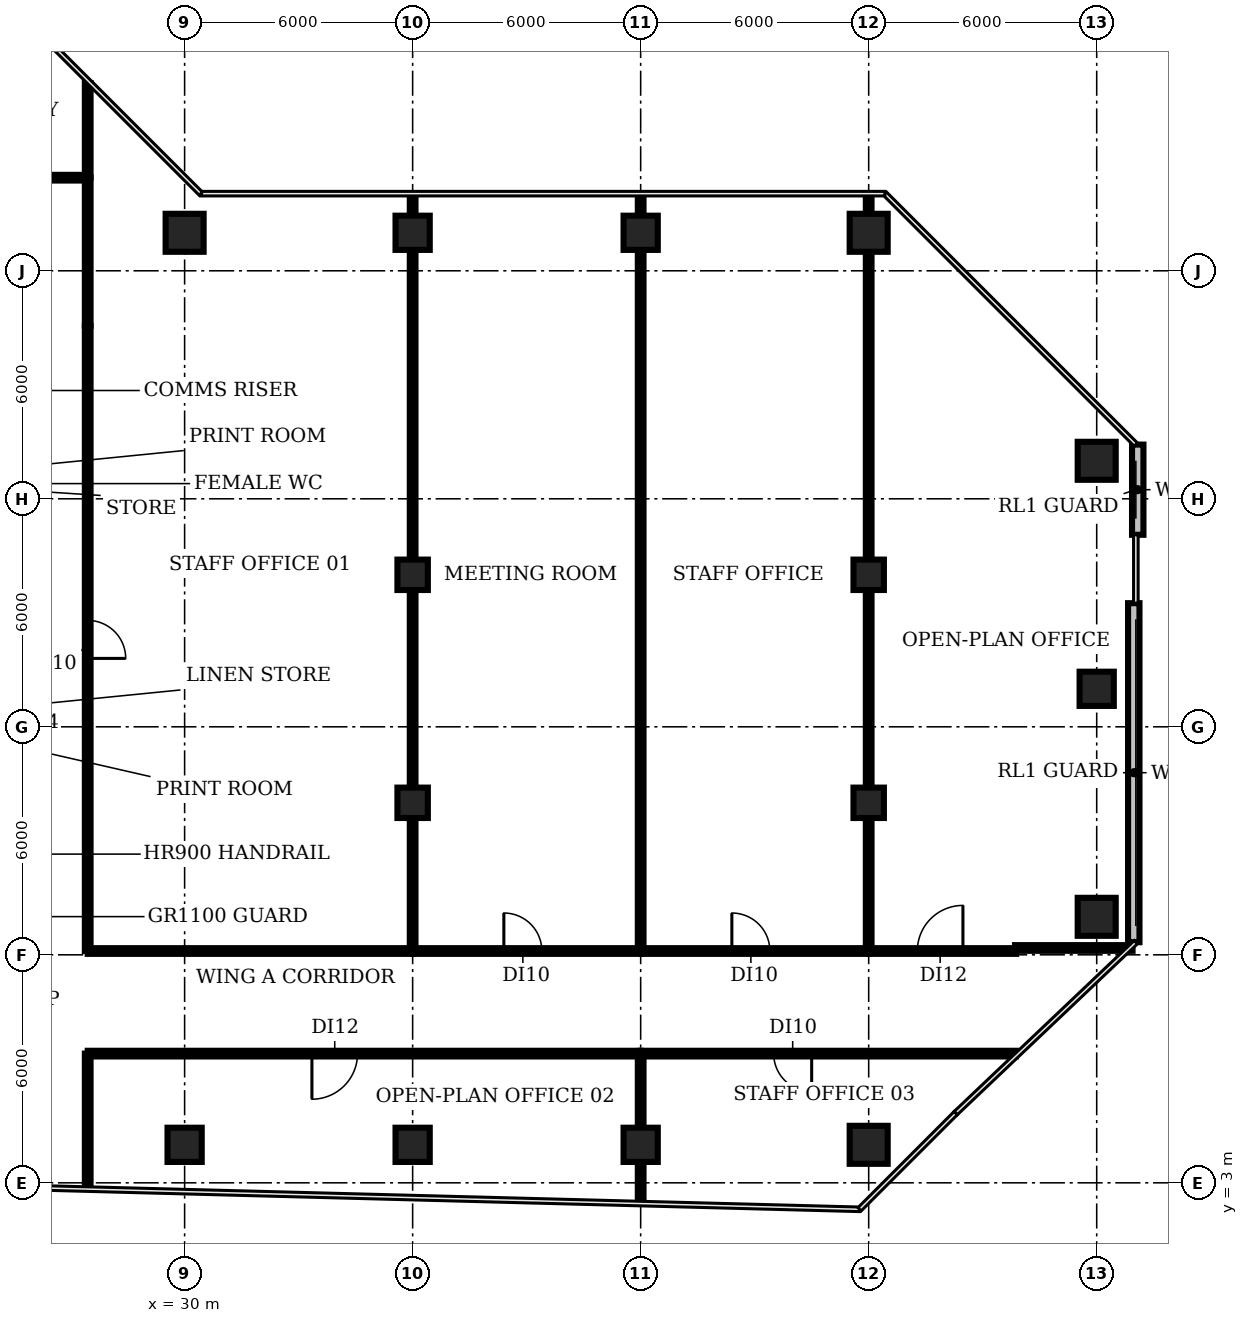
"""IFC4 building model, lengths in metres.
Left out: names, types, materials, properties, quantities, classifications, styles, units other than length and angle.
Written with IfcOpenShell. Run it as: python <this file> out.ifc"""

import sys

from ifc_helpers import new_model, si_unit, direction, frame, frame_2d, origin, origin_2d, place, context, subcontext, project, spatial, rectangle, circle, extrude, element, fill, save


model = new_model("IFC4")
c1 = context("Model", 3, precision=1e-05, world=origin(), true_north=direction((0.0, 1.0)))
c2 = subcontext(c1, "Body", "Model", "MODEL_VIEW")
j1 = project(units=[si_unit("LENGTHUNIT", "METRE"), si_unit("PLANEANGLEUNIT", "RADIAN")], contexts=[c1])
p1 = place(None, origin())
s1 = spatial("IfcSite", under=j1, at=p1, CompositionType="ELEMENT")
p2 = place(p1, origin())
s2 = spatial("IfcBuilding", under=s1, at=p2, CompositionType="ELEMENT")
p3 = place(p2, frame((0.0, 0.0, 117.2)))
s3 = spatial("IfcBuildingStorey", under=s2, at=p3, CompositionType="ELEMENT", Elevation=117.2)
p4 = place(p3, frame((30.0, 4.0, 0.0), z_axis=(0.0, 0.0, 1.0), x_axis=(1.0, 0.0, 0.0)))
e1 = element("IfcColumn", 1, at=p4, inside=s3, PredefinedType="COLUMN", context=c2, shape_type="SweptSolid", body=[
    extrude(rectangle(XDim=0.9, YDim=0.9, at=origin_2d()), origin(), (0.0, 0.0, 1.0), 3.85),
])
p5 = place(p3, frame((30.0, 28.0, 0.0), z_axis=(0.0, 0.0, 1.0), x_axis=(1.0, 0.0, 0.0)))
e2 = element("IfcColumn", 2, at=p5, inside=s3, PredefinedType="COLUMN", context=c2, shape_type="SweptSolid", body=[
    extrude(circle(Radius=0.5, at=origin_2d()), origin(), (0.0, 0.0, 1.0), 3.85),
])
p6 = place(p3, frame((36.0, 4.0, 0.0), z_axis=(0.0, 0.0, 1.0), x_axis=(1.0, 0.0, 0.0)))
e3 = element("IfcColumn", 3, at=p6, inside=s3, PredefinedType="COLUMN", context=c2, shape_type="SweptSolid", body=[
    extrude(rectangle(XDim=0.9, YDim=0.9, at=origin_2d()), origin(), (0.0, 0.0, 1.0), 3.85),
])
for number, where, z_axis, x_axis in (
    (4, (36.0, 13.0, 0.0), (0.0, 0.0, 1.0), (1.0, 0.0, 0.0)),
    (5, (36.0, 19.0, 0.0), (0.0, 0.0, 1.0), (1.0, 0.0, 0.0)),
):
    element("IfcColumn", number, at=place(p3, frame(where, z_axis=z_axis, x_axis=x_axis)), inside=s3, PredefinedType="COLUMN", context=c2, shape_type="SweptSolid", body=[
        extrude(rectangle(XDim=0.8, YDim=0.8, at=origin_2d()), origin(), (0.0, 0.0, 1.0), 3.85),
    ])
for number, where, z_axis, x_axis in (
    (6, (36.0, 28.0, 0.0), (0.0, 0.0, 1.0), (1.0, 0.0, 0.0)),
    (7, (42.0, 4.0, 0.0), (0.0, 0.0, 1.0), (1.0, 0.0, 0.0)),
    (8, (42.0, 28.0, 0.0), (0.0, 0.0, 1.0), (1.0, 0.0, 0.0)),
):
    element("IfcColumn", number, at=place(p3, frame(where, z_axis=z_axis, x_axis=x_axis)), inside=s3, PredefinedType="COLUMN", context=c2, shape_type="SweptSolid", body=[
        extrude(rectangle(XDim=0.9, YDim=0.9, at=origin_2d()), origin(), (0.0, 0.0, 1.0), 3.85),
    ])
p7 = place(p3, frame((48.0, 4.0, 0.0), z_axis=(0.0, 0.0, 1.0), x_axis=(1.0, 0.0, 0.0)))
e9 = element("IfcColumn", 9, at=p7, inside=s3, PredefinedType="COLUMN", context=c2, shape_type="SweptSolid", body=[
    extrude(circle(Radius=0.5, at=origin_2d()), origin(), (0.0, 0.0, 1.0), 3.85),
])
for number, where, z_axis, x_axis in (
    (10, (48.0, 13.0, 0.0), (0.0, 0.0, 1.0), (1.0, 0.0, 0.0)),
    (11, (48.0, 19.0, 0.0), (0.0, 0.0, 1.0), (1.0, 0.0, 0.0)),
):
    element("IfcColumn", number, at=place(p3, frame(where, z_axis=z_axis, x_axis=x_axis)), inside=s3, PredefinedType="COLUMN", context=c2, shape_type="SweptSolid", body=[
        extrude(rectangle(XDim=0.8, YDim=0.8, at=origin_2d()), origin(), (0.0, 0.0, 1.0), 3.85),
    ])
for number, where, z_axis, x_axis in (
    (12, (48.0, 28.0, 0.0), (0.0, 0.0, 1.0), (1.0, 0.0, 0.0)),
    (13, (54.0, 10.0, 0.0), (0.0, 0.0, 1.0), (1.0, 0.0, 0.0)),
):
    element("IfcColumn", number, at=place(p3, frame(where, z_axis=z_axis, x_axis=x_axis)), inside=s3, PredefinedType="COLUMN", context=c2, shape_type="SweptSolid", body=[
        extrude(circle(Radius=0.5, at=origin_2d()), origin(), (0.0, 0.0, 1.0), 3.85),
    ])
p8 = place(p3, frame((54.0, 16.0, 0.0), z_axis=(0.0, 0.0, 1.0), x_axis=(1.0, 0.0, 0.0)))
e14 = element("IfcColumn", 14, at=p8, inside=s3, PredefinedType="COLUMN", context=c2, shape_type="SweptSolid", body=[
    extrude(rectangle(XDim=0.9, YDim=0.9, at=origin_2d()), origin(), (0.0, 0.0, 1.0), 3.85),
])
p9 = place(p3, frame((54.0, 22.0, 0.0), z_axis=(0.0, 0.0, 1.0), x_axis=(1.0, 0.0, 0.0)))
e15 = element("IfcColumn", 15, at=p9, inside=s3, PredefinedType="COLUMN", context=c2, shape_type="SweptSolid", body=[
    extrude(circle(Radius=0.5, at=origin_2d()), origin(), (0.0, 0.0, 1.0), 3.85),
])
p10 = place(p3, frame((54.975, 9.332, 0.0), z_axis=(0.0, 0.0, 1.0), x_axis=(0.0, 1.0, 0.0)))
e16 = element("IfcWall", 16, at=p10, inside=s3, PredefinedType="SOLIDWALL", context=c2, shape_type="SweptSolid", body=[
    extrude(rectangle(XDim=8.921, YDim=0.3, at=frame_2d((4.461, 0.0))), origin(), (0.0, 0.0, 1.0), 3.85),
])
p11 = place(p3, frame((55.08, 20.053, 0.0), z_axis=(0.0, 0.0, 1.0), x_axis=(0.0, 1.0, 0.0)))
e17 = element("IfcWall", 17, at=p11, inside=s3, PredefinedType="SOLIDWALL", context=c2, shape_type="SweptSolid", body=[
    extrude(rectangle(XDim=2.374, YDim=0.3, at=frame_2d((1.187, 0.0))), origin(), (0.0, 0.0, 1.0), 3.85),
])
p12 = place(p3, frame((23.85, 29.45, 0.0), z_axis=(0.0, 0.0, 1.0), x_axis=(1.0, 0.0, 0.0)))
e18 = element("IfcWall", 18, at=p12, inside=s3, PredefinedType="PARTITIONING", context=c2, shape_type="SweptSolid", body=[
    extrude(rectangle(XDim=3.6, YDim=0.15, at=frame_2d((1.8, 0.0))), origin(), (0.0, 0.0, 1.0), 2.83),
])
p13 = place(p12, frame((1.3, 0.0, 0.0)))
e19 = element("IfcOpeningElement", 19, at=p13, cuts=e18, PredefinedType="OPENING", context=c2, shape_type="SweptSolid", body=[
    extrude(rectangle(XDim=0.9, YDim=2.1, at=frame_2d((0.45, 1.05))), frame((0.0, 0.085, 0.0), z_axis=(0.0, -1.0, 0.0), x_axis=(1.0, 0.0, 0.0)), (0.0, 0.0, 1.0), 0.17),
])
p14 = place(p3, frame((27.45, 2.88, 0.0), z_axis=(0.0, 0.0, 1.0), x_axis=(0.0, 1.0, 0.0)))
e20 = element("IfcWall", 20, at=p14, inside=s3, PredefinedType="PARTITIONING", context=c2, shape_type="SweptSolid", body=[
    extrude(rectangle(XDim=3.52, YDim=0.15, at=frame_2d((1.76, 0.0))), origin(), (0.0, 0.0, 1.0), 2.83),
])
p15 = place(p3, frame((27.45, 9.1, 0.0), z_axis=(0.0, 0.0, 1.0), x_axis=(1.0, 0.0, 0.0)))
e21 = element("IfcWall", 21, at=p15, inside=s3, PredefinedType="PARTITIONING", context=c2, shape_type="SweptSolid", body=[
    extrude(rectangle(XDim=8.55, YDim=0.15, at=frame_2d((4.275, 0.0))), origin(), (0.0, 0.0, 1.0), 2.83),
])
p16 = place(p3, frame((27.45, 25.55, 0.0), z_axis=(0.0, 0.0, 1.0), x_axis=(0.0, -1.0, 0.0)))
e22 = element("IfcWall", 22, at=p16, inside=s3, PredefinedType="PARTITIONING", context=c2, shape_type="SweptSolid", body=[
    extrude(rectangle(XDim=16.45, YDim=0.15, at=frame_2d((8.225, 0.0))), origin(), (0.0, 0.0, 1.0), 2.83),
])
p17 = place(p16, frame((7.75, 0.0, 0.0)))
e23 = element("IfcOpeningElement", 23, at=p17, cuts=e22, PredefinedType="OPENING", context=c2, shape_type="SweptSolid", body=[
    extrude(rectangle(XDim=1.0, YDim=2.1, at=frame_2d((0.5, 1.05))), frame((0.0, 0.085, 0.0), z_axis=(0.0, -1.0, 0.0), x_axis=(1.0, 0.0, 0.0)), (0.0, 0.0, 1.0), 0.17),
])
p18 = place(p3, frame((27.45, 25.55, 0.0), z_axis=(0.0, 0.0, 1.0), x_axis=(0.0, 1.0, 0.0)))
e24 = element("IfcWall", 24, at=p18, inside=s3, PredefinedType="PARTITIONING", context=c2, shape_type="SweptSolid", body=[
    extrude(rectangle(XDim=3.9, YDim=0.15, at=frame_2d((1.95, 0.0))), origin(), (0.0, 0.0, 1.0), 2.83),
])
p19 = place(p3, frame((27.45, 29.45, 0.0), z_axis=(0.0, 0.0, 1.0), x_axis=(0.0, 1.0, 0.0)))
e25 = element("IfcWall", 25, at=p19, inside=s3, PredefinedType="PARTITIONING", context=c2, shape_type="SweptSolid", body=[
    extrude(rectangle(XDim=2.49, YDim=0.15, at=frame_2d((1.245, 0.0))), origin(), (0.0, 0.0, 1.0), 2.83),
])
p20 = place(p3, frame((36.0, 9.1, 0.0), z_axis=(0.0, 0.0, 1.0), x_axis=(0.0, 1.0, 0.0)))
e26 = element("IfcWall", 26, at=p20, inside=s3, PredefinedType="PARTITIONING", context=c2, shape_type="SweptSolid", body=[
    extrude(rectangle(XDim=19.88, YDim=0.15, at=frame_2d((9.94, 0.0))), origin(), (0.0, 0.0, 1.0), 2.83),
])
p21 = place(p3, frame((36.0, 9.1, 0.0), z_axis=(0.0, 0.0, 1.0), x_axis=(1.0, 0.0, 0.0)))
e27 = element("IfcWall", 27, at=p21, inside=s3, PredefinedType="PARTITIONING", context=c2, shape_type="SweptSolid", body=[
    extrude(rectangle(XDim=6.0, YDim=0.15, at=frame_2d((3.0, 0.0))), origin(), (0.0, 0.0, 1.0), 2.83),
])
p22 = place(p21, frame((2.4, 0.0, 0.0)))
e28 = element("IfcOpeningElement", 28, at=p22, cuts=e27, PredefinedType="OPENING", context=c2, shape_type="SweptSolid", body=[
    extrude(rectangle(XDim=1.0, YDim=2.1, at=frame_2d((0.5, 1.05))), frame((0.0, 0.085, 0.0), z_axis=(0.0, -1.0, 0.0), x_axis=(1.0, 0.0, 0.0)), (0.0, 0.0, 1.0), 0.17),
])
p23 = place(p3, frame((42.0, 2.5, 0.0), z_axis=(0.0, 0.0, 1.0), x_axis=(0.0, 1.0, 0.0)))
e29 = element("IfcWall", 29, at=p23, inside=s3, PredefinedType="PARTITIONING", context=c2, shape_type="SweptSolid", body=[
    extrude(rectangle(XDim=3.9, YDim=0.15, at=frame_2d((1.95, 0.0))), origin(), (0.0, 0.0, 1.0), 2.83),
])
p24 = place(p3, frame((42.0, 6.4, 0.0), z_axis=(0.0, 0.0, 1.0), x_axis=(-1.0, 0.0, 0.0)))
e30 = element("IfcWall", 30, at=p24, inside=s3, PredefinedType="PARTITIONING", context=c2, shape_type="SweptSolid", body=[
    extrude(rectangle(XDim=14.55, YDim=0.15, at=frame_2d((7.275, 0.0))), origin(), (0.0, 0.0, 1.0), 2.83),
])
p25 = place(p24, frame((7.45, 0.0, 0.0)))
e31 = element("IfcOpeningElement", 31, at=p25, cuts=e30, PredefinedType="OPENING", context=c2, shape_type="SweptSolid", body=[
    extrude(rectangle(XDim=1.2, YDim=2.1, at=frame_2d((0.6, 1.05))), frame((0.0, 0.085, 0.0), z_axis=(0.0, -1.0, 0.0), x_axis=(1.0, 0.0, 0.0)), (0.0, 0.0, 1.0), 0.17),
])
p26 = place(p3, frame((42.0, 9.1, 0.0), z_axis=(0.0, 0.0, 1.0), x_axis=(0.0, 1.0, 0.0)))
e32 = element("IfcWall", 32, at=p26, inside=s3, PredefinedType="PARTITIONING", context=c2, shape_type="SweptSolid", body=[
    extrude(rectangle(XDim=19.88, YDim=0.15, at=frame_2d((9.94, 0.0))), origin(), (0.0, 0.0, 1.0), 2.83),
])
p27 = place(p3, frame((42.0, 9.1, 0.0), z_axis=(0.0, 0.0, 1.0), x_axis=(1.0, 0.0, 0.0)))
e33 = element("IfcWall", 33, at=p27, inside=s3, PredefinedType="PARTITIONING", context=c2, shape_type="SweptSolid", body=[
    extrude(rectangle(XDim=6.0, YDim=0.15, at=frame_2d((3.0, 0.0))), origin(), (0.0, 0.0, 1.0), 2.83),
])
p28 = place(p27, frame((2.4, 0.0, 0.0)))
e34 = element("IfcOpeningElement", 34, at=p28, cuts=e33, PredefinedType="OPENING", context=c2, shape_type="SweptSolid", body=[
    extrude(rectangle(XDim=1.0, YDim=2.1, at=frame_2d((0.5, 1.05))), frame((0.0, 0.085, 0.0), z_axis=(0.0, -1.0, 0.0), x_axis=(1.0, 0.0, 0.0)), (0.0, 0.0, 1.0), 0.17),
])
p29 = place(p3, frame((48.0, 9.1, 0.0), z_axis=(0.0, 0.0, 1.0), x_axis=(0.0, 1.0, 0.0)))
e35 = element("IfcWall", 35, at=p29, inside=s3, PredefinedType="PARTITIONING", context=c2, shape_type="SweptSolid", body=[
    extrude(rectangle(XDim=19.88, YDim=0.15, at=frame_2d((9.94, 0.0))), origin(), (0.0, 0.0, 1.0), 2.83),
])
p30 = place(p3, frame((48.0, 9.1, 0.0), z_axis=(0.0, 0.0, 1.0), x_axis=(1.0, 0.0, 0.0)))
e36 = element("IfcWall", 36, at=p30, inside=s3, PredefinedType="PARTITIONING", context=c2, shape_type="SweptSolid", body=[
    extrude(rectangle(XDim=3.88, YDim=0.15, at=frame_2d((1.94, 0.0))), origin(), (0.0, 0.0, 1.0), 2.83),
])
p31 = place(p30, frame((1.28, 0.0, 0.0)))
e37 = element("IfcOpeningElement", 37, at=p31, cuts=e36, PredefinedType="OPENING", context=c2, shape_type="SweptSolid", body=[
    extrude(rectangle(XDim=1.2, YDim=2.1, at=frame_2d((0.6, 1.05))), frame((0.0, 0.085, 0.0), z_axis=(0.0, -1.0, 0.0), x_axis=(1.0, 0.0, 0.0)), (0.0, 0.0, 1.0), 0.17),
])
p32 = place(p3, frame((51.85, 9.18, 0.0), z_axis=(0.0, 0.0, 1.0), x_axis=(1.0, 0.0, 0.0)))
e38 = element("IfcWall", 38, at=p32, inside=s3, PredefinedType="PARTITIONING", context=c2, shape_type="SweptSolid", body=[
    extrude(rectangle(XDim=3.093, YDim=0.15, at=frame_2d((1.546, 0.0))), origin(), (0.0, 0.0, 1.0), 2.83),
])
p33 = place(p3, frame((51.87, 6.4, 0.0), z_axis=(0.0, 0.0, 1.0), x_axis=(-1.0, 0.0, 0.0)))
e39 = element("IfcWall", 39, at=p33, inside=s3, PredefinedType="PARTITIONING", context=c2, shape_type="SweptSolid", body=[
    extrude(rectangle(XDim=9.87, YDim=0.15, at=frame_2d((4.935, 0.0))), origin(), (0.0, 0.0, 1.0), 2.83),
])
p34 = place(p33, frame((5.37, 0.0, 0.0)))
e40 = element("IfcOpeningElement", 40, at=p34, cuts=e39, PredefinedType="OPENING", context=c2, shape_type="SweptSolid", body=[
    extrude(rectangle(XDim=1.0, YDim=2.1, at=frame_2d((0.5, 1.05))), frame((0.0, 0.085, 0.0), z_axis=(0.0, -1.0, 0.0), x_axis=(1.0, 0.0, 0.0)), (0.0, 0.0, 1.0), 0.17),
])
p35 = place(p17, origin())
e41 = element("IfcDoor", 41, at=p35, inside=s3, OperationType="SINGLE_SWING_RIGHT", PredefinedType="DOOR", context=c2, shape_type="SweptSolid", body=[
    extrude(rectangle(XDim=1.0, YDim=2.1, at=frame_2d((0.5, 1.05))), frame((0.0, 0.025, 0.0), z_axis=(0.0, -1.0, 0.0), x_axis=(1.0, 0.0, 0.0)), (0.0, 0.0, 1.0), 0.05),
])
fill(e23, e41)
p36 = place(p22, origin())
e42 = element("IfcDoor", 42, at=p36, inside=s3, OperationType="SINGLE_SWING_LEFT", PredefinedType="DOOR", context=c2, shape_type="SweptSolid", body=[
    extrude(rectangle(XDim=1.0, YDim=2.1, at=frame_2d((0.5, 1.05))), frame((0.0, 0.025, 0.0), z_axis=(0.0, -1.0, 0.0), x_axis=(1.0, 0.0, 0.0)), (0.0, 0.0, 1.0), 0.05),
])
fill(e28, e42)
p37 = place(p25, origin())
e43 = element("IfcDoor", 43, at=p37, inside=s3, OperationType="SINGLE_SWING_RIGHT", PredefinedType="DOOR", context=c2, shape_type="SweptSolid", body=[
    extrude(rectangle(XDim=1.2, YDim=2.1, at=frame_2d((0.6, 1.05))), frame((0.0, 0.025, 0.0), z_axis=(0.0, -1.0, 0.0), x_axis=(1.0, 0.0, 0.0)), (0.0, 0.0, 1.0), 0.05),
])
fill(e31, e43)
p38 = place(p28, origin())
e44 = element("IfcDoor", 44, at=p38, inside=s3, OperationType="SINGLE_SWING_LEFT", PredefinedType="DOOR", context=c2, shape_type="SweptSolid", body=[
    extrude(rectangle(XDim=1.0, YDim=2.1, at=frame_2d((0.5, 1.05))), frame((0.0, 0.025, 0.0), z_axis=(0.0, -1.0, 0.0), x_axis=(1.0, 0.0, 0.0)), (0.0, 0.0, 1.0), 0.05),
])
fill(e34, e44)
p39 = place(p31, origin())
e45 = element("IfcDoor", 45, at=p39, inside=s3, OperationType="SINGLE_SWING_RIGHT", PredefinedType="DOOR", context=c2, shape_type="SweptSolid", body=[
    extrude(rectangle(XDim=1.2, YDim=2.1, at=frame_2d((0.6, 1.05))), frame((0.0, 0.025, 0.0), z_axis=(0.0, -1.0, 0.0), x_axis=(1.0, 0.0, 0.0)), (0.0, 0.0, 1.0), 0.05),
])
fill(e37, e45)
p40 = place(p34, origin())
e46 = element("IfcDoor", 46, at=p40, inside=s3, OperationType="SINGLE_SWING_LEFT", PredefinedType="DOOR", context=c2, shape_type="SweptSolid", body=[
    extrude(rectangle(XDim=1.0, YDim=2.1, at=frame_2d((0.5, 1.05))), frame((0.0, 0.025, 0.0), z_axis=(0.0, -1.0, 0.0), x_axis=(1.0, 0.0, 0.0)), (0.0, 0.0, 1.0), 0.05),
])
fill(e40, e46)
save(model, sys.argv[1])
